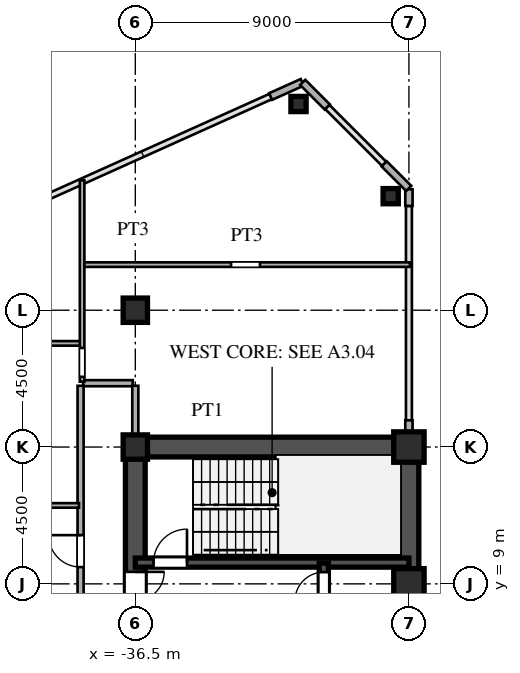
"""IFC4 building model, lengths in metres.
Left out: names, types, materials, properties, quantities, classifications, styles, units other than length and angle.
Written with IfcOpenShell. Run it as: python <this file> out.ifc"""

import sys

from ifc_helpers import new_model, si_unit, direction, frame, frame_2d, origin, origin_2d, place, context, subcontext, project, spatial, rectangle, hollow_rectangle, i_section, extrude, source, transform, mapped, element, fill, save


model = new_model("IFC4")
c1 = context("Model", 3, precision=1e-05, world=origin(), true_north=direction((0.0, 1.0)))
c2 = subcontext(c1, "Body", "Model", "MODEL_VIEW")
j1 = project(units=[si_unit("LENGTHUNIT", "METRE"), si_unit("PLANEANGLEUNIT", "RADIAN")], contexts=[c1])
p1 = place(None, origin())
s1 = spatial("IfcSite", under=j1, at=p1, CompositionType="ELEMENT")
p2 = place(p1, origin())
s2 = spatial("IfcBuilding", under=s1, at=p2, CompositionType="ELEMENT")
p3 = place(p2, frame((0.0, 0.0, 69.3)))
s3 = spatial("IfcBuildingStorey", under=s2, at=p3, CompositionType="ELEMENT", Elevation=69.3)
m1 = source(origin(), c2, "Body", "SweptSolid", [
    extrude(hollow_rectangle(XDim=1.0, YDim=1.0, WallThickness=0.042, at=origin_2d()), origin(), (0.0, 0.0, 1.0), 3.6),
])
for number, where, z_axis, x_axis in (
    (1, (-27.5, 9.0, 0.0), (0.0, 0.0, 1.0), (1.0, 0.0, 0.0)),
    (2, (-27.5, 13.5, 0.0), (0.0, 0.0, 1.0), (1.0, 0.0, 0.0)),
):
    element("IfcColumn", number, at=place(p3, frame(where, z_axis=z_axis, x_axis=x_axis)), inside=s3, PredefinedType="COLUMN", context=c2, shape_type="MappedRepresentation", body=[
        mapped(m1, transform((0.0, 0.0, 0.0), scale=1.0)),
    ])
m2 = source(origin(), c2, "Body", "SweptSolid", [
    extrude(i_section(OverallWidth=0.8, OverallDepth=0.8, WebThickness=0.032, FlangeThickness=0.05, at=origin_2d()), origin(), (0.0, 0.0, 1.0), 3.6),
])
for number, where, z_axis, x_axis in (
    (3, (-36.5, 13.5, 0.0), (0.0, 0.0, 1.0), (1.0, 0.0, 0.0)),
    (4, (-36.5, 18.0, 0.0), (0.0, 0.0, 1.0), (1.0, 0.0, 0.0)),
):
    element("IfcColumn", number, at=place(p3, frame(where, z_axis=z_axis, x_axis=x_axis)), inside=s3, PredefinedType="COLUMN", context=c2, shape_type="MappedRepresentation", body=[
        mapped(m2, transform((0.0, 0.0, 0.0), scale=1.0)),
    ])
m3 = source(origin(), c2, "Body", "SweptSolid", [
    extrude(hollow_rectangle(XDim=0.5, YDim=0.5, WallThickness=0.02, at=origin_2d()), origin(), (0.0, 0.0, 1.0), 3.6),
])
for number, where, z_axis, x_axis in (
    (5, (-28.1, 21.751, 0.0), (0.0, 0.0, 1.0), (1.0, 0.0, 0.0)),
    (6, (-31.131, 24.783, 0.0), (0.0, 0.0, 1.0), (1.0, 0.0, 0.0)),
):
    element("IfcColumn", number, at=place(p3, frame(where, z_axis=z_axis, x_axis=x_axis)), inside=s3, PredefinedType="COLUMN", context=c2, shape_type="MappedRepresentation", body=[
        mapped(m3, transform((0.0, 0.0, 0.0), scale=1.0)),
    ])
p4 = place(p3, frame((-27.5, 13.83, 0.0), z_axis=(0.0, 0.0, 1.0), x_axis=(0.0, 1.0, 0.0)))
e7 = element("IfcWall", 7, at=p4, inside=s3, PredefinedType="SOLIDWALL", context=c2, shape_type="SweptSolid", body=[
    extrude(rectangle(XDim=0.55, YDim=0.24, at=frame_2d((0.275, 0.0))), origin(), (0.0, 0.0, 1.0), 2.88),
])
p5 = place(p3, frame((-27.5, 21.43, 0.0), z_axis=(0.0, 0.0, 1.0), x_axis=(0.0, 1.0, 0.0)))
e8 = element("IfcWall", 8, at=p5, inside=s3, PredefinedType="SOLIDWALL", context=c2, shape_type="SweptSolid", body=[
    extrude(rectangle(XDim=0.55, YDim=0.24, at=frame_2d((0.275, 0.0))), origin(), (0.0, 0.0, 1.0), 3.38),
])
for number, where, z_axis, x_axis in (
    (9, (-27.507, 22.007, 0.0), (0.0, 0.0, 1.0), (-0.707, 0.707, 0.0)),
    (10, (-30.187, 24.687, 0.0), (0.0, 0.0, 1.0), (-0.707, 0.707, 0.0)),
):
    element("IfcWall", number, at=place(p3, frame(where, z_axis=z_axis, x_axis=x_axis)), inside=s3, PredefinedType="SOLIDWALL", context=c2, shape_type="SweptSolid", body=[
        extrude(rectangle(XDim=1.14, YDim=0.24, at=frame_2d((0.57, 0.0))), origin(), (0.0, 0.0, 1.0), 3.38),
    ])
p6 = place(p3, frame((-31.009, 25.496, 0.0), z_axis=(0.0, 0.0, 1.0), x_axis=(-0.911929519623, -0.410346866979, 0.0)))
e11 = element("IfcWall", 11, at=p6, inside=s3, PredefinedType="SOLIDWALL", context=c2, shape_type="SweptSolid", body=[
    extrude(rectangle(XDim=1.14, YDim=0.24, at=frame_2d((0.57, 0.0))), origin(), (0.0, 0.0, 1.0), 3.38),
])
p7 = place(p3, frame((-27.5, 1.3, 0.0), z_axis=(0.0, 0.0, 1.0), x_axis=(0.0, 1.0, 0.0)))
e12 = element("IfcWall", 12, at=p7, inside=s3, PredefinedType="SHEAR", context=c2, shape_type="SweptSolid", body=[
    extrude(rectangle(XDim=12.2, YDim=0.65, at=frame_2d((6.1, 0.0))), origin(), (0.0, 0.0, 1.0), 3.38),
])
p8 = place(p3, frame((-36.5, 13.5, 0.0), z_axis=(0.0, 0.0, 1.0), x_axis=(1.0, 0.0, 0.0)))
e13 = element("IfcWall", 13, at=p8, inside=s3, PredefinedType="SHEAR", context=c2, shape_type="SweptSolid", body=[
    extrude(rectangle(XDim=9.0, YDim=0.65, at=frame_2d((4.5, 0.0))), origin(), (0.0, 0.0, 1.0), 3.38),
])
p9 = place(p3, frame((-36.5, 8.2, 0.0), z_axis=(0.0, 0.0, 1.0), x_axis=(0.0, 1.0, 0.0)))
e14 = element("IfcWall", 14, at=p9, inside=s3, PredefinedType="SHEAR", context=c2, shape_type="SweptSolid", body=[
    extrude(rectangle(XDim=5.45, YDim=0.65, at=frame_2d((2.725, 0.0))), origin(), (0.0, 0.0, 1.0), 3.38),
])
p10 = place(p9, frame((0.245, 0.0, 0.0)))
e15 = element("IfcOpeningElement", 15, at=p10, cuts=e14, PredefinedType="OPENING", context=c2, shape_type="SweptSolid", body=[
    extrude(rectangle(XDim=0.95, YDim=2.15, at=frame_2d((0.475, 1.075))), frame((0.0, 0.335, 0.0), z_axis=(0.0, -1.0, 0.0), x_axis=(1.0, 0.0, 0.0)), (0.0, 0.0, 1.0), 0.67),
])
p11 = place(p3, frame((-36.5, 9.7, 0.0), z_axis=(0.0, 0.0, 1.0), x_axis=(1.0, 0.0, 0.0)))
e16 = element("IfcWall", 16, at=p11, inside=s3, PredefinedType="SHEAR", context=c2, shape_type="SweptSolid", body=[
    extrude(rectangle(XDim=9.0, YDim=0.3, at=frame_2d((4.5, 0.0))), origin(), (0.0, 0.0, 1.0), 3.38),
])
p12 = place(p11, frame((0.6, 0.0, 0.0)))
e17 = element("IfcOpeningElement", 17, at=p12, cuts=e16, PredefinedType="OPENING", context=c2, shape_type="SweptSolid", body=[
    extrude(rectangle(XDim=1.1, YDim=2.2, at=frame_2d((0.55, 1.1))), frame((0.0, 0.16, 0.0), z_axis=(0.0, -1.0, 0.0), x_axis=(1.0, 0.0, 0.0)), (0.0, 0.0, 1.0), 0.32),
])
p13 = place(p3, frame((-30.3, 8.15, 0.0), z_axis=(0.0, 0.0, 1.0), x_axis=(0.0, 1.0, 0.0)))
e18 = element("IfcWall", 18, at=p13, inside=s3, PredefinedType="SHEAR", context=c2, shape_type="SweptSolid", body=[
    extrude(rectangle(XDim=1.53, YDim=0.3, at=frame_2d((0.765, 0.0))), origin(), (0.0, 0.0, 1.0), 3.38),
])
p14 = place(p13, frame((0.285, 0.0, 0.0)))
e19 = element("IfcOpeningElement", 19, at=p14, cuts=e18, PredefinedType="OPENING", context=c2, shape_type="SweptSolid", body=[
    extrude(rectangle(XDim=0.95, YDim=2.15, at=frame_2d((0.475, 1.075))), frame((0.0, 0.16, 0.0), z_axis=(0.0, -1.0, 0.0), x_axis=(1.0, 0.0, 0.0)), (0.0, 0.0, 1.0), 0.32),
])
p15 = place(p3, frame((-44.4, 11.58, 0.0), z_axis=(0.0, 0.0, 1.0), x_axis=(1.0, 0.0, 0.0)))
e20 = element("IfcWall", 20, at=p15, inside=s3, PredefinedType="PARTITIONING", context=c2, shape_type="SweptSolid", body=[
    extrude(rectangle(XDim=6.05, YDim=0.15, at=frame_2d((3.025, 0.0))), origin(), (0.0, 0.0, 1.0), 3.38),
])
p16 = place(p15, frame((2.55, 0.0, 0.0)))
e21 = element("IfcOpeningElement", 21, at=p16, cuts=e20, PredefinedType="OPENING", context=c2, shape_type="SweptSolid", body=[
    extrude(rectangle(XDim=0.95, YDim=2.15, at=frame_2d((0.475, 1.075))), frame((0.0, 0.085, 0.0), z_axis=(0.0, -1.0, 0.0), x_axis=(1.0, 0.0, 0.0)), (0.0, 0.0, 1.0), 0.17),
])
p17 = place(p3, frame((-38.215, 15.6, 0.0), z_axis=(0.0, 0.0, 1.0), x_axis=(1.0, 0.0, 0.0)))
e22 = element("IfcWall", 22, at=p17, inside=s3, PredefinedType="PARTITIONING", context=c2, shape_type="SweptSolid", body=[
    extrude(rectangle(XDim=1.63, YDim=0.2, at=frame_2d((0.815, 0.0))), origin(), (0.0, 0.0, 1.0), 3.38),
])
p18 = place(p3, frame((-44.4, 16.91, 0.0), z_axis=(0.0, 0.0, 1.0), x_axis=(1.0, 0.0, 0.0)))
e23 = element("IfcWall", 23, at=p18, inside=s3, PredefinedType="PARTITIONING", context=c2, shape_type="SweptSolid", body=[
    extrude(rectangle(XDim=6.1, YDim=0.15, at=frame_2d((3.05, 0.0))), origin(), (0.0, 0.0, 1.0), 3.38),
])
p19 = place(p3, frame((-38.2, 19.5, 0.0), z_axis=(0.0, 0.0, 1.0), x_axis=(1.0, 0.0, 0.0)))
e24 = element("IfcWall", 24, at=p19, inside=s3, PredefinedType="PARTITIONING", context=c2, shape_type="SweptSolid", body=[
    extrude(rectangle(XDim=10.735, YDim=0.15, at=frame_2d((5.367, 0.0))), origin(), (0.0, 0.0, 1.0), 3.38),
])
p20 = place(p19, frame((4.85, 0.0, 0.0)))
e25 = element("IfcOpeningElement", 25, at=p20, cuts=e24, PredefinedType="OPENING", context=c2, shape_type="SweptSolid", body=[
    extrude(rectangle(XDim=0.95, YDim=2.15, at=frame_2d((0.475, 1.075))), frame((0.0, 0.085, 0.0), z_axis=(0.0, -1.0, 0.0), x_axis=(1.0, 0.0, 0.0)), (0.0, 0.0, 1.0), 0.17),
])
p21 = place(p3, frame((-38.3, -15.515, 0.0), z_axis=(0.0, 0.0, 1.0), x_axis=(0.0, 1.0, 0.0)))
e26 = element("IfcWall", 26, at=p21, inside=s3, PredefinedType="PARTITIONING", context=c2, shape_type="SweptSolid", body=[
    extrude(rectangle(XDim=31.03, YDim=0.2, at=frame_2d((15.515, 0.0))), origin(), (0.0, 0.0, 1.0), 3.38),
])
p22 = place(p21, frame((1.345, 0.0, 0.0)))
e27 = element("IfcOpeningElement", 27, at=p22, cuts=e26, PredefinedType="OPENING", context=c2, shape_type="SweptSolid", body=[
    extrude(rectangle(XDim=1.05, YDim=2.25, at=frame_2d((0.525, 1.125))), frame((0.0, 0.11, 0.0), z_axis=(0.0, -1.0, 0.0), x_axis=(1.0, 0.0, 0.0)), (0.0, 0.0, 1.0), 0.22),
])
p23 = place(p21, frame((12.28, 0.0, 0.0)))
e28 = element("IfcOpeningElement", 28, at=p23, cuts=e26, PredefinedType="OPENING", context=c2, shape_type="SweptSolid", body=[
    extrude(rectangle(XDim=1.05, YDim=2.25, at=frame_2d((0.525, 1.125))), frame((0.0, 0.11, 0.0), z_axis=(0.0, -1.0, 0.0), x_axis=(1.0, 0.0, 0.0)), (0.0, 0.0, 1.0), 0.22),
])
p24 = place(p21, frame((25.067, 0.0, 0.0)))
e29 = element("IfcOpeningElement", 29, at=p24, cuts=e26, PredefinedType="OPENING", context=c2, shape_type="SweptSolid", body=[
    extrude(rectangle(XDim=1.05, YDim=2.25, at=frame_2d((0.525, 1.125))), frame((0.0, 0.11, 0.0), z_axis=(0.0, -1.0, 0.0), x_axis=(1.0, 0.0, 0.0)), (0.0, 0.0, 1.0), 0.22),
])
p25 = place(p3, frame((-38.25, 15.65, 0.0), z_axis=(0.0, 0.0, 1.0), x_axis=(0.0, 1.0, 0.0)))
e30 = element("IfcWall", 30, at=p25, inside=s3, PredefinedType="PARTITIONING", context=c2, shape_type="SweptSolid", body=[
    extrude(rectangle(XDim=6.623, YDim=0.15, at=frame_2d((3.312, 0.0))), origin(), (0.0, 0.0, 1.0), 3.38),
])
p26 = place(p25, frame((0.16, 0.0, 0.0)))
e31 = element("IfcOpeningElement", 31, at=p26, cuts=e30, PredefinedType="OPENING", context=c2, shape_type="SweptSolid", body=[
    extrude(rectangle(XDim=0.95, YDim=2.15, at=frame_2d((0.475, 1.075))), frame((0.0, 0.085, 0.0), z_axis=(0.0, -1.0, 0.0), x_axis=(1.0, 0.0, 0.0)), (0.0, 0.0, 1.0), 0.17),
])
p27 = place(p3, frame((-36.5, 13.83, 0.0), z_axis=(0.0, 0.0, 1.0), x_axis=(0.0, 1.0, 0.0)))
e32 = element("IfcWall", 32, at=p27, inside=s3, PredefinedType="PARTITIONING", context=c2, shape_type="SweptSolid", body=[
    extrude(rectangle(XDim=1.685, YDim=0.2, at=frame_2d((0.842, 0.0))), origin(), (0.0, 0.0, 1.0), 2.68),
])
m4 = source(origin(), c2, "Body", "SweptSolid", [
    extrude(rectangle(XDim=0.95, YDim=2.15, at=frame_2d((0.475, 1.075))), frame((0.0, 0.025, 0.0), z_axis=(0.0, -1.0, 0.0), x_axis=(1.0, 0.0, 0.0)), (0.0, 0.0, 1.0), 0.05),
])
p28 = place(p10, frame((0.95, 0.0, 0.0), z_axis=(0.0, 0.0, 1.0), x_axis=(-1.0, 0.0, 0.0)))
e33 = element("IfcDoor", 33, at=p28, inside=s3, OperationType="SINGLE_SWING_RIGHT", PredefinedType="DOOR", context=c2, shape_type="MappedRepresentation", body=[
    mapped(m4, transform((0.0, 0.0, 0.0), scale=1.0)),
])
fill(e15, e33)
m5 = source(origin(), c2, "Body", "SweptSolid", [
    extrude(rectangle(XDim=1.1, YDim=2.2, at=frame_2d((0.55, 1.1))), frame((0.0, 0.025, 0.0), z_axis=(0.0, -1.0, 0.0), x_axis=(1.0, 0.0, 0.0)), (0.0, 0.0, 1.0), 0.05),
])
p29 = place(p12, origin())
e34 = element("IfcDoor", 34, at=p29, inside=s3, OperationType="SINGLE_SWING_RIGHT", PredefinedType="DOOR", context=c2, shape_type="MappedRepresentation", body=[
    mapped(m5, transform((0.0, 0.0, 0.0), scale=1.0)),
])
fill(e17, e34)
p30 = place(p14, origin())
e35 = element("IfcDoor", 35, at=p30, inside=s3, OperationType="SINGLE_SWING_LEFT", PredefinedType="DOOR", context=c2, shape_type="MappedRepresentation", body=[
    mapped(m4, transform((0.0, 0.0, 0.0), scale=1.0)),
])
fill(e19, e35)
m6 = source(origin(), c2, "Body", "SweptSolid", [
    extrude(rectangle(XDim=1.05, YDim=2.25, at=frame_2d((0.525, 1.125))), frame((0.0, 0.025, 0.0), z_axis=(0.0, -1.0, 0.0), x_axis=(1.0, 0.0, 0.0)), (0.0, 0.0, 1.0), 0.05),
])
p31 = place(p24, origin())
e36 = element("IfcDoor", 36, at=p31, inside=s3, OperationType="SINGLE_SWING_RIGHT", PredefinedType="DOOR", context=c2, shape_type="MappedRepresentation", body=[
    mapped(m6, transform((0.0, 0.0, 0.0), scale=1.0)),
])
fill(e29, e36)
save(model, sys.argv[1])
